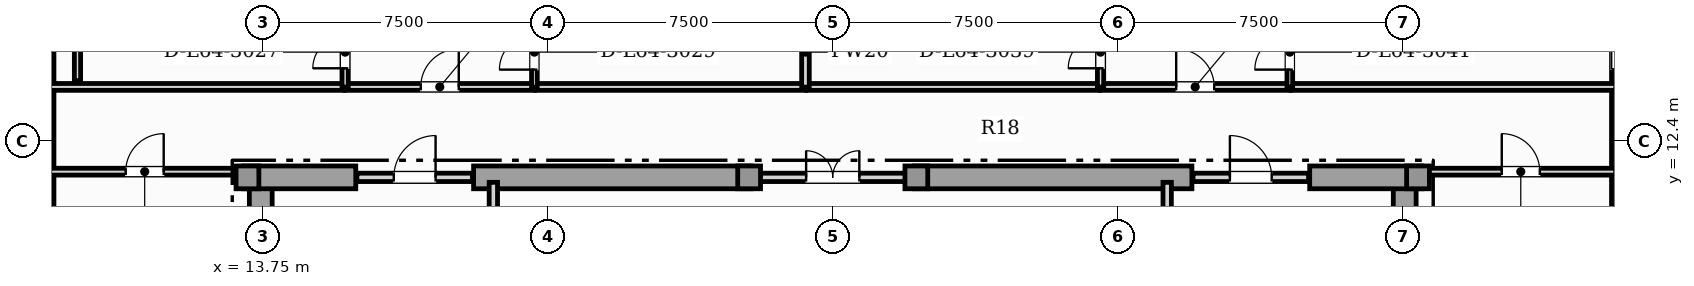
"""IFC4 building model, lengths in metres.
Left out: names, types, materials, properties, quantities, classifications, styles, units other than length and angle.
Written with IfcOpenShell. Run it as: python <this file> out.ifc"""

import sys

from ifc_helpers import new_model, si_unit, direction, frame, frame_2d, origin, origin_2d, place, context, subcontext, project, spatial, rectangle, extrude, element, fill, save


model = new_model("IFC4")
c1 = context("Model", 3, precision=1e-05, world=origin(), true_north=direction((0.0, 1.0)))
c2 = subcontext(c1, "Body", "Model", "MODEL_VIEW")
j1 = project(units=[si_unit("LENGTHUNIT", "METRE"), si_unit("PLANEANGLEUNIT", "RADIAN")], contexts=[c1])
p1 = place(None, origin())
s1 = spatial("IfcSite", under=j1, at=p1, CompositionType="ELEMENT")
p2 = place(p1, origin())
s2 = spatial("IfcBuilding", under=s1, at=p2, CompositionType="ELEMENT")
p3 = place(p2, frame((0.0, 0.0, 260.6)))
s3 = spatial("IfcBuildingStorey", under=s2, at=p3, CompositionType="ELEMENT", Elevation=260.6)
for number, where, z_axis, x_axis in (
    (1, (13.7, 0.92, 0.0), (0.0, 0.0, 1.0), (0.0, 1.0, 0.0)),
    (2, (43.8, 0.92, 0.0), (0.0, 0.0, 1.0), (0.0, 1.0, 0.0)),
):
    element("IfcWall", number, at=place(p3, frame(where, z_axis=z_axis, x_axis=x_axis)), inside=s3, PredefinedType="SHEAR", context=c2, shape_type="SweptSolid", body=[
        extrude(rectangle(XDim=10.53, YDim=0.6, at=frame_2d((5.265, 0.0))), origin(), (0.0, 0.0, 1.0), 3.65),
    ])
p4 = place(p3, frame((13.25, 11.45, 0.0), z_axis=(0.0, 0.0, 1.0), x_axis=(1.0, 0.0, 0.0)))
e3 = element("IfcWall", 3, at=p4, inside=s3, PredefinedType="SHEAR", context=c2, shape_type="SweptSolid", body=[
    extrude(rectangle(XDim=2.95, YDim=0.6, at=frame_2d((1.475, 0.0))), origin(), (0.0, 0.0, 1.0), 3.65),
])
for number, where, z_axis, x_axis in (
    (4, (19.3, 11.45, 0.0), (0.0, 0.0, 1.0), (1.0, 0.0, 0.0)),
    (5, (30.9, 11.45, 0.0), (0.0, 0.0, 1.0), (1.0, 0.0, 0.0)),
):
    element("IfcWall", number, at=place(p3, frame(where, z_axis=z_axis, x_axis=x_axis)), inside=s3, PredefinedType="SHEAR", context=c2, shape_type="SweptSolid", body=[
        extrude(rectangle(XDim=7.3, YDim=0.6, at=frame_2d((3.65, 0.0))), origin(), (0.0, 0.0, 1.0), 3.65),
    ])
p5 = place(p3, frame((41.3, 11.45, 0.0), z_axis=(0.0, 0.0, 1.0), x_axis=(1.0, 0.0, 0.0)))
e6 = element("IfcWall", 6, at=p5, inside=s3, PredefinedType="SHEAR", context=c2, shape_type="SweptSolid", body=[
    extrude(rectangle(XDim=2.95, YDim=0.6, at=frame_2d((1.475, 0.0))), origin(), (0.0, 0.0, 1.0), 3.65),
])
for number, where, z_axis, x_axis in (
    (7, (13.35, 11.45, 0.0), (0.0, 0.0, 1.0), (1.0, 0.0, 0.0)),
    (8, (44.15, 11.45, 0.0), (0.0, 0.0, 1.0), (1.0, 0.0, 0.0)),
    (9, (26.55, 11.45, 0.0), (0.0, 0.0, 1.0), (1.0, 0.0, 0.0)),
    (10, (30.95, 11.45, 0.0), (0.0, 0.0, 1.0), (1.0, 0.0, 0.0)),
):
    element("IfcColumn", number, at=place(p3, frame(where, z_axis=z_axis, x_axis=x_axis)), inside=s3, PredefinedType="COLUMN", context=c2, shape_type="SweptSolid", body=[
        extrude(rectangle(XDim=0.6, YDim=0.6, at=origin_2d()), origin(), (0.0, 0.0, 1.0), 3.85),
    ])
p6 = place(p3, frame((49.372, 3.24, 0.0), z_axis=(0.0, 0.0, 1.0), x_axis=(0.0, 1.0, 0.0)))
e11 = element("IfcWall", 11, at=p6, inside=s3, PredefinedType="SOLIDWALL", context=c2, shape_type="SweptSolid", body=[
    extrude(rectangle(XDim=17.1, YDim=0.26, at=frame_2d((8.55, 0.0))), origin(), (0.0, 0.0, 1.0), 3.65),
])
p7 = place(p6, frame((11.055, 0.0, 0.95)))
e12 = element("IfcOpeningElement", 12, at=p7, cuts=e11, PredefinedType="OPENING", context=c2, shape_type="SweptSolid", body=[
    extrude(rectangle(XDim=0.9, YDim=1.5, at=frame_2d((0.45, 0.75))), frame((0.0, 0.14, 0.0), z_axis=(0.0, -1.0, 0.0), x_axis=(1.0, 0.0, 0.0)), (0.0, 0.0, 1.0), 0.28),
])
p8 = place(p6, frame((12.885, 0.0, 0.95)))
e13 = element("IfcOpeningElement", 13, at=p8, cuts=e11, PredefinedType="OPENING", context=c2, shape_type="SweptSolid", body=[
    extrude(rectangle(XDim=0.9, YDim=1.5, at=frame_2d((0.45, 0.75))), frame((0.0, 0.14, 0.0), z_axis=(0.0, -1.0, 0.0), x_axis=(1.0, 0.0, 0.0)), (0.0, 0.0, 1.0), 0.28),
])
p9 = place(p6, frame((14.56, 0.0, 0.95)))
e14 = element("IfcOpeningElement", 14, at=p9, cuts=e11, PredefinedType="OPENING", context=c2, shape_type="SweptSolid", body=[
    extrude(rectangle(XDim=0.9, YDim=1.5, at=frame_2d((0.45, 0.75))), frame((0.0, 0.14, 0.0), z_axis=(0.0, -1.0, 0.0), x_axis=(1.0, 0.0, 0.0)), (0.0, 0.0, 1.0), 0.28),
])
p10 = place(p3, frame((8.128, 20.34, 0.0), z_axis=(0.0, 0.0, 1.0), x_axis=(0.0, -1.0, 0.0)))
e15 = element("IfcWall", 15, at=p10, inside=s3, PredefinedType="SOLIDWALL", context=c2, shape_type="SweptSolid", body=[
    extrude(rectangle(XDim=17.1, YDim=0.26, at=frame_2d((8.55, 0.0))), origin(), (0.0, 0.0, 1.0), 3.65),
])
p11 = place(p10, frame((15.42, 0.0, 0.95)))
e16 = element("IfcOpeningElement", 16, at=p11, cuts=e15, PredefinedType="OPENING", context=c2, shape_type="SweptSolid", body=[
    extrude(rectangle(XDim=0.9, YDim=1.5, at=frame_2d((0.45, 0.75))), frame((0.0, 0.14, 0.0), z_axis=(0.0, -1.0, 0.0), x_axis=(1.0, 0.0, 0.0)), (0.0, 0.0, 1.0), 0.28),
])
p12 = place(p3, frame((19.82, 8.52, 0.0), z_axis=(0.0, 0.0, 1.0), x_axis=(0.0, 1.0, 0.0)))
e17 = element("IfcWall", 17, at=p12, inside=s3, PredefinedType="SOLIDWALL", context=c2, shape_type="SweptSolid", body=[
    extrude(rectangle(XDim=2.8, YDim=0.22, at=frame_2d((1.4, 0.0))), origin(), (0.0, 0.0, 1.0), 3.105),
])
p13 = place(p12, frame((0.85, 0.0, 0.0)))
e18 = element("IfcOpeningElement", 18, at=p13, cuts=e17, PredefinedType="OPENING", context=c2, shape_type="SweptSolid", body=[
    extrude(rectangle(XDim=1.1, YDim=2.2, at=frame_2d((0.55, 1.1))), frame((0.0, 0.12, 0.0), z_axis=(0.0, -1.0, 0.0), x_axis=(1.0, 0.0, 0.0)), (0.0, 0.0, 1.0), 0.24),
])
p14 = place(p3, frame((37.55, 8.52, 0.0), z_axis=(0.0, 0.0, 1.0), x_axis=(0.0, 1.0, 0.0)))
e19 = element("IfcWall", 19, at=p14, inside=s3, PredefinedType="SOLIDWALL", context=c2, shape_type="SweptSolid", body=[
    extrude(rectangle(XDim=2.8, YDim=0.22, at=frame_2d((1.4, 0.0))), origin(), (0.0, 0.0, 1.0), 3.105),
])
p15 = place(p14, frame((0.85, 0.0, 0.0)))
e20 = element("IfcOpeningElement", 20, at=p15, cuts=e19, PredefinedType="OPENING", context=c2, shape_type="SweptSolid", body=[
    extrude(rectangle(XDim=1.1, YDim=2.2, at=frame_2d((0.55, 1.1))), frame((0.0, 0.12, 0.0), z_axis=(0.0, -1.0, 0.0), x_axis=(1.0, 0.0, 0.0)), (0.0, 0.0, 1.0), 0.24),
])
p16 = place(p3, frame((16.23, 11.45, 0.0), z_axis=(0.0, 0.0, 1.0), x_axis=(1.0, 0.0, 0.0)))
e21 = element("IfcWall", 21, at=p16, inside=s3, PredefinedType="SOLIDWALL", context=c2, shape_type="SweptSolid", body=[
    extrude(rectangle(XDim=3.04, YDim=0.22, at=frame_2d((1.52, 0.0))), origin(), (0.0, 0.0, 1.0), 3.65),
])
p17 = place(p16, frame((0.97, 0.0, 0.0)))
e22 = element("IfcOpeningElement", 22, at=p17, cuts=e21, PredefinedType="OPENING", context=c2, shape_type="SweptSolid", body=[
    extrude(rectangle(XDim=1.1, YDim=2.2, at=frame_2d((0.55, 1.1))), frame((0.0, 0.12, 0.0), z_axis=(0.0, -1.0, 0.0), x_axis=(1.0, 0.0, 0.0)), (0.0, 0.0, 1.0), 0.24),
])
p18 = place(p3, frame((26.63, 11.45, 0.0), z_axis=(0.0, 0.0, 1.0), x_axis=(1.0, 0.0, 0.0)))
e23 = element("IfcWall", 23, at=p18, inside=s3, PredefinedType="SOLIDWALL", context=c2, shape_type="SweptSolid", body=[
    extrude(rectangle(XDim=4.24, YDim=0.22, at=frame_2d((2.12, 0.0))), origin(), (0.0, 0.0, 1.0), 3.65),
])
p19 = place(p18, frame((1.42, 0.0, 0.0)))
e24 = element("IfcOpeningElement", 24, at=p19, cuts=e23, PredefinedType="OPENING", context=c2, shape_type="SweptSolid", body=[
    extrude(rectangle(XDim=1.4, YDim=2.2, at=frame_2d((0.7, 1.1))), frame((0.0, 0.12, 0.0), z_axis=(0.0, -1.0, 0.0), x_axis=(1.0, 0.0, 0.0)), (0.0, 0.0, 1.0), 0.24),
])
p20 = place(p3, frame((38.23, 11.45, 0.0), z_axis=(0.0, 0.0, 1.0), x_axis=(1.0, 0.0, 0.0)))
e25 = element("IfcWall", 25, at=p20, inside=s3, PredefinedType="SOLIDWALL", context=c2, shape_type="SweptSolid", body=[
    extrude(rectangle(XDim=3.04, YDim=0.22, at=frame_2d((1.52, 0.0))), origin(), (0.0, 0.0, 1.0), 3.65),
])
p21 = place(p20, frame((0.97, 0.0, 0.0)))
e26 = element("IfcOpeningElement", 26, at=p21, cuts=e25, PredefinedType="OPENING", context=c2, shape_type="SweptSolid", body=[
    extrude(rectangle(XDim=1.1, YDim=2.2, at=frame_2d((0.55, 1.1))), frame((0.0, 0.12, 0.0), z_axis=(0.0, -1.0, 0.0), x_axis=(1.0, 0.0, 0.0)), (0.0, 0.0, 1.0), 0.24),
])
p22 = place(p3, frame((8.147, 11.6, 0.0), z_axis=(0.0, 0.0, 1.0), x_axis=(1.0, 0.0, 0.0)))
e27 = element("IfcWall", 27, at=p22, inside=s3, PredefinedType="PARTITIONING", context=c2, shape_type="SweptSolid", body=[
    extrude(rectangle(XDim=4.998, YDim=0.18, at=frame_2d((2.499, 0.0))), origin(), (0.0, 0.0, 1.0), 3.65),
])
p23 = place(p22, frame((1.999, 0.0, 0.0)))
e28 = element("IfcOpeningElement", 28, at=p23, cuts=e27, PredefinedType="OPENING", context=c2, shape_type="SweptSolid", body=[
    extrude(rectangle(XDim=1.0, YDim=2.15, at=frame_2d((0.5, 1.075))), frame((0.0, 0.1, 0.0), z_axis=(0.0, -1.0, 0.0), x_axis=(1.0, 0.0, 0.0)), (0.0, 0.0, 1.0), 0.2),
])
p24 = place(p3, frame((44.355, 11.6, 0.0), z_axis=(0.0, 0.0, 1.0), x_axis=(1.0, 0.0, 0.0)))
e29 = element("IfcWall", 29, at=p24, inside=s3, PredefinedType="PARTITIONING", context=c2, shape_type="SweptSolid", body=[
    extrude(rectangle(XDim=4.998, YDim=0.18, at=frame_2d((2.499, 0.0))), origin(), (0.0, 0.0, 1.0), 3.65),
])
p25 = place(p24, frame((1.999, 0.0, 0.0)))
e30 = element("IfcOpeningElement", 30, at=p25, cuts=e29, PredefinedType="OPENING", context=c2, shape_type="SweptSolid", body=[
    extrude(rectangle(XDim=1.0, YDim=2.15, at=frame_2d((0.5, 1.075))), frame((0.0, 0.1, 0.0), z_axis=(0.0, -1.0, 0.0), x_axis=(1.0, 0.0, 0.0)), (0.0, 0.0, 1.0), 0.2),
])
p26 = place(p3, frame((15.915, 13.83, 0.0), z_axis=(0.0, 0.0, 1.0), x_axis=(1.0, 0.0, 0.0)))
e31 = element("IfcWall", 31, at=p26, inside=s3, PredefinedType="PARTITIONING", context=c2, shape_type="SweptSolid", body=[
    extrude(rectangle(XDim=4.99, YDim=0.18, at=frame_2d((2.495, 0.0))), origin(), (0.0, 0.0, 1.0), 3.65),
])
p27 = place(p26, frame((1.995, 0.0, 0.0)))
e32 = element("IfcOpeningElement", 32, at=p27, cuts=e31, PredefinedType="OPENING", context=c2, shape_type="SweptSolid", body=[
    extrude(rectangle(XDim=1.0, YDim=2.15, at=frame_2d((0.5, 1.075))), frame((0.0, 0.1, 0.0), z_axis=(0.0, -1.0, 0.0), x_axis=(1.0, 0.0, 0.0)), (0.0, 0.0, 1.0), 0.2),
])
p28 = place(p3, frame((8.147, 13.83, 0.0), z_axis=(0.0, 0.0, 1.0), x_axis=(1.0, 0.0, 0.0)))
e33 = element("IfcWall", 33, at=p28, inside=s3, PredefinedType="PARTITIONING", context=c2, shape_type="SweptSolid", body=[
    extrude(rectangle(XDim=7.738, YDim=0.18, at=frame_2d((3.869, 0.0))), origin(), (0.0, 0.0, 1.0), 3.65),
])
p29 = place(p3, frame((20.935, 13.83, 0.0), z_axis=(0.0, 0.0, 1.0), x_axis=(1.0, 0.0, 0.0)))
e34 = element("IfcWall", 34, at=p29, inside=s3, PredefinedType="PARTITIONING", context=c2, shape_type="SweptSolid", body=[
    extrude(rectangle(XDim=7.103, YDim=0.18, at=frame_2d((3.551, 0.0))), origin(), (0.0, 0.0, 1.0), 3.65),
])
p30 = place(p3, frame((35.792, 13.83, 0.0), z_axis=(0.0, 0.0, 1.0), x_axis=(1.0, 0.0, 0.0)))
e35 = element("IfcWall", 35, at=p30, inside=s3, PredefinedType="PARTITIONING", context=c2, shape_type="SweptSolid", body=[
    extrude(rectangle(XDim=4.99, YDim=0.18, at=frame_2d((2.495, 0.0))), origin(), (0.0, 0.0, 1.0), 3.65),
])
p31 = place(p30, frame((1.995, 0.0, 0.0)))
e36 = element("IfcOpeningElement", 36, at=p31, cuts=e35, PredefinedType="OPENING", context=c2, shape_type="SweptSolid", body=[
    extrude(rectangle(XDim=1.0, YDim=2.15, at=frame_2d((0.5, 1.075))), frame((0.0, 0.1, 0.0), z_axis=(0.0, -1.0, 0.0), x_axis=(1.0, 0.0, 0.0)), (0.0, 0.0, 1.0), 0.2),
])
p32 = place(p3, frame((28.067, 13.83, 0.0), z_axis=(0.0, 0.0, 1.0), x_axis=(1.0, 0.0, 0.0)))
e37 = element("IfcWall", 37, at=p32, inside=s3, PredefinedType="PARTITIONING", context=c2, shape_type="SweptSolid", body=[
    extrude(rectangle(XDim=7.695, YDim=0.18, at=frame_2d((3.847, 0.0))), origin(), (0.0, 0.0, 1.0), 3.65),
])
p33 = place(p3, frame((40.812, 13.83, 0.0), z_axis=(0.0, 0.0, 1.0), x_axis=(1.0, 0.0, 0.0)))
e38 = element("IfcWall", 38, at=p33, inside=s3, PredefinedType="PARTITIONING", context=c2, shape_type="SweptSolid", body=[
    extrude(rectangle(XDim=8.541, YDim=0.18, at=frame_2d((4.271, 0.0))), origin(), (0.0, 0.0, 1.0), 3.65),
])
p34 = place(p3, frame((15.92, 13.825, 0.0), z_axis=(0.0, 0.0, 1.0), x_axis=(0.0, 1.0, 0.0)))
e39 = element("IfcWall", 39, at=p34, inside=s3, PredefinedType="PLUMBINGWALL", context=c2, shape_type="SweptSolid", body=[
    extrude(rectangle(XDim=1.84, YDim=0.165, at=frame_2d((0.92, 0.0))), origin(), (0.0, 0.0, 1.0), 3.65),
])
p35 = place(p34, frame((0.495, 0.0, 0.0)))
e40 = element("IfcOpeningElement", 40, at=p35, cuts=e39, PredefinedType="OPENING", context=c2, shape_type="SweptSolid", body=[
    extrude(rectangle(XDim=0.85, YDim=2.1, at=frame_2d((0.425, 1.05))), frame((0.0, 0.093, 0.0), z_axis=(0.0, -1.0, 0.0), x_axis=(1.0, 0.0, 0.0)), (0.0, 0.0, 1.0), 0.185),
])
p36 = place(p3, frame((20.9, 13.825, 0.0), z_axis=(0.0, 0.0, 1.0), x_axis=(0.0, 1.0, 0.0)))
e41 = element("IfcWall", 41, at=p36, inside=s3, PredefinedType="PARTITIONING", context=c2, shape_type="SweptSolid", body=[
    extrude(rectangle(XDim=1.84, YDim=0.15, at=frame_2d((0.92, 0.0))), origin(), (0.0, 0.0, 1.0), 3.65),
])
p37 = place(p36, frame((0.46, 0.0, 0.0)))
e42 = element("IfcOpeningElement", 42, at=p37, cuts=e41, PredefinedType="OPENING", context=c2, shape_type="SweptSolid", body=[
    extrude(rectangle(XDim=0.92, YDim=2.1, at=frame_2d((0.46, 1.05))), frame((0.0, 0.085, 0.0), z_axis=(0.0, -1.0, 0.0), x_axis=(1.0, 0.0, 0.0)), (0.0, 0.0, 1.0), 0.17),
])
p38 = place(p3, frame((28.032, 13.825, 0.0), z_axis=(0.0, 0.0, 1.0), x_axis=(0.0, 1.0, 0.0)))
e43 = element("IfcWall", 43, at=p38, inside=s3, PredefinedType="PARTITIONING", context=c2, shape_type="SweptSolid", body=[
    extrude(rectangle(XDim=1.84, YDim=0.2, at=frame_2d((0.92, 0.0))), origin(), (0.0, 0.0, 1.0), 3.65),
])
p39 = place(p3, frame((35.797, 13.825, 0.0), z_axis=(0.0, 0.0, 1.0), x_axis=(0.0, 1.0, 0.0)))
e44 = element("IfcWall", 44, at=p39, inside=s3, PredefinedType="PLUMBINGWALL", context=c2, shape_type="SweptSolid", body=[
    extrude(rectangle(XDim=1.84, YDim=0.165, at=frame_2d((0.92, 0.0))), origin(), (0.0, 0.0, 1.0), 3.65),
])
p40 = place(p39, frame((0.495, 0.0, 0.0)))
e45 = element("IfcOpeningElement", 45, at=p40, cuts=e44, PredefinedType="OPENING", context=c2, shape_type="SweptSolid", body=[
    extrude(rectangle(XDim=0.85, YDim=2.1, at=frame_2d((0.425, 1.05))), frame((0.0, 0.093, 0.0), z_axis=(0.0, -1.0, 0.0), x_axis=(1.0, 0.0, 0.0)), (0.0, 0.0, 1.0), 0.185),
])
p41 = place(p3, frame((40.777, 13.825, 0.0), z_axis=(0.0, 0.0, 1.0), x_axis=(0.0, 1.0, 0.0)))
e46 = element("IfcWall", 46, at=p41, inside=s3, PredefinedType="PARTITIONING", context=c2, shape_type="SweptSolid", body=[
    extrude(rectangle(XDim=1.84, YDim=0.15, at=frame_2d((0.92, 0.0))), origin(), (0.0, 0.0, 1.0), 3.65),
])
p42 = place(p41, frame((0.46, 0.0, 0.0)))
e47 = element("IfcOpeningElement", 47, at=p42, cuts=e46, PredefinedType="OPENING", context=c2, shape_type="SweptSolid", body=[
    extrude(rectangle(XDim=0.92, YDim=2.1, at=frame_2d((0.46, 1.05))), frame((0.0, 0.085, 0.0), z_axis=(0.0, -1.0, 0.0), x_axis=(1.0, 0.0, 0.0)), (0.0, 0.0, 1.0), 0.17),
])
p43 = place(p3, frame((8.878, 13.995, 0.0), z_axis=(0.0, 0.0, 1.0), x_axis=(0.0, 1.0, 0.0)))
e48 = element("IfcWall", 48, at=p43, inside=s3, PredefinedType="PLUMBINGWALL", context=c2, shape_type="SweptSolid", body=[
    extrude(rectangle(XDim=1.5, YDim=0.165, at=frame_2d((0.75, 0.0))), origin(), (0.0, 0.0, 1.0), 3.65),
])
p44 = place(p17, origin())
e49 = element("IfcDoor", 49, at=p44, inside=s3, OperationType="SINGLE_SWING_RIGHT", PredefinedType="DOOR", context=c2, shape_type="SweptSolid", body=[
    extrude(rectangle(XDim=1.1, YDim=2.2, at=frame_2d((0.55, 1.1))), frame((0.0, 0.025, 0.0), z_axis=(0.0, -1.0, 0.0), x_axis=(1.0, 0.0, 0.0)), (0.0, 0.0, 1.0), 0.05),
])
fill(e22, e49)
p45 = place(p19, origin())
e50 = element("IfcDoor", 50, at=p45, inside=s3, OperationType="DOUBLE_DOOR_SINGLE_SWING", PredefinedType="DOOR", context=c2, shape_type="SweptSolid", body=[
    extrude(rectangle(XDim=1.4, YDim=2.2, at=frame_2d((0.7, 1.1))), frame((0.0, 0.025, 0.0), z_axis=(0.0, -1.0, 0.0), x_axis=(1.0, 0.0, 0.0)), (0.0, 0.0, 1.0), 0.05),
])
fill(e24, e50)
p46 = place(p21, origin())
e51 = element("IfcDoor", 51, at=p46, inside=s3, OperationType="SINGLE_SWING_LEFT", PredefinedType="DOOR", context=c2, shape_type="SweptSolid", body=[
    extrude(rectangle(XDim=1.1, YDim=2.2, at=frame_2d((0.55, 1.1))), frame((0.0, 0.025, 0.0), z_axis=(0.0, -1.0, 0.0), x_axis=(1.0, 0.0, 0.0)), (0.0, 0.0, 1.0), 0.05),
])
fill(e26, e51)
p47 = place(p23, origin())
e52 = element("IfcDoor", 52, at=p47, inside=s3, OperationType="SINGLE_SWING_RIGHT", PredefinedType="DOOR", context=c2, shape_type="SweptSolid", body=[
    extrude(rectangle(XDim=1.0, YDim=2.15, at=frame_2d((0.5, 1.075))), frame((0.0, 0.025, 0.0), z_axis=(0.0, -1.0, 0.0), x_axis=(1.0, 0.0, 0.0)), (0.0, 0.0, 1.0), 0.05),
])
fill(e28, e52)
p48 = place(p25, origin())
e53 = element("IfcDoor", 53, at=p48, inside=s3, OperationType="SINGLE_SWING_LEFT", PredefinedType="DOOR", context=c2, shape_type="SweptSolid", body=[
    extrude(rectangle(XDim=1.0, YDim=2.15, at=frame_2d((0.5, 1.075))), frame((0.0, 0.025, 0.0), z_axis=(0.0, -1.0, 0.0), x_axis=(1.0, 0.0, 0.0)), (0.0, 0.0, 1.0), 0.05),
])
fill(e30, e53)
p49 = place(p27, origin())
e54 = element("IfcDoor", 54, at=p49, inside=s3, OperationType="SINGLE_SWING_RIGHT", PredefinedType="DOOR", context=c2, shape_type="SweptSolid", body=[
    extrude(rectangle(XDim=1.0, YDim=2.15, at=frame_2d((0.5, 1.075))), frame((0.0, 0.025, 0.0), z_axis=(0.0, -1.0, 0.0), x_axis=(1.0, 0.0, 0.0)), (0.0, 0.0, 1.0), 0.05),
])
fill(e32, e54)
p50 = place(p31, origin())
e55 = element("IfcDoor", 55, at=p50, inside=s3, OperationType="SINGLE_SWING_LEFT", PredefinedType="DOOR", context=c2, shape_type="SweptSolid", body=[
    extrude(rectangle(XDim=1.0, YDim=2.15, at=frame_2d((0.5, 1.075))), frame((0.0, 0.025, 0.0), z_axis=(0.0, -1.0, 0.0), x_axis=(1.0, 0.0, 0.0)), (0.0, 0.0, 1.0), 0.05),
])
fill(e36, e55)
p51 = place(p35, origin())
e56 = element("IfcDoor", 56, at=p51, inside=s3, OperationType="SINGLE_SWING_LEFT", PredefinedType="DOOR", context=c2, shape_type="SweptSolid", body=[
    extrude(rectangle(XDim=0.85, YDim=2.1, at=frame_2d((0.425, 1.05))), frame((0.0, 0.025, 0.0), z_axis=(0.0, -1.0, 0.0), x_axis=(1.0, 0.0, 0.0)), (0.0, 0.0, 1.0), 0.05),
])
fill(e40, e56)
p52 = place(p37, origin())
e57 = element("IfcDoor", 57, at=p52, inside=s3, OperationType="SINGLE_SWING_LEFT", PredefinedType="DOOR", context=c2, shape_type="SweptSolid", body=[
    extrude(rectangle(XDim=0.92, YDim=2.1, at=frame_2d((0.46, 1.05))), frame((0.0, 0.025, 0.0), z_axis=(0.0, -1.0, 0.0), x_axis=(1.0, 0.0, 0.0)), (0.0, 0.0, 1.0), 0.05),
])
fill(e42, e57)
p53 = place(p40, origin())
e58 = element("IfcDoor", 58, at=p53, inside=s3, OperationType="SINGLE_SWING_LEFT", PredefinedType="DOOR", context=c2, shape_type="SweptSolid", body=[
    extrude(rectangle(XDim=0.85, YDim=2.1, at=frame_2d((0.425, 1.05))), frame((0.0, 0.025, 0.0), z_axis=(0.0, -1.0, 0.0), x_axis=(1.0, 0.0, 0.0)), (0.0, 0.0, 1.0), 0.05),
])
fill(e45, e58)
p54 = place(p42, origin())
e59 = element("IfcDoor", 59, at=p54, inside=s3, OperationType="SINGLE_SWING_LEFT", PredefinedType="DOOR", context=c2, shape_type="SweptSolid", body=[
    extrude(rectangle(XDim=0.92, YDim=2.1, at=frame_2d((0.46, 1.05))), frame((0.0, 0.025, 0.0), z_axis=(0.0, -1.0, 0.0), x_axis=(1.0, 0.0, 0.0)), (0.0, 0.0, 1.0), 0.05),
])
fill(e47, e59)
save(model, sys.argv[1])
